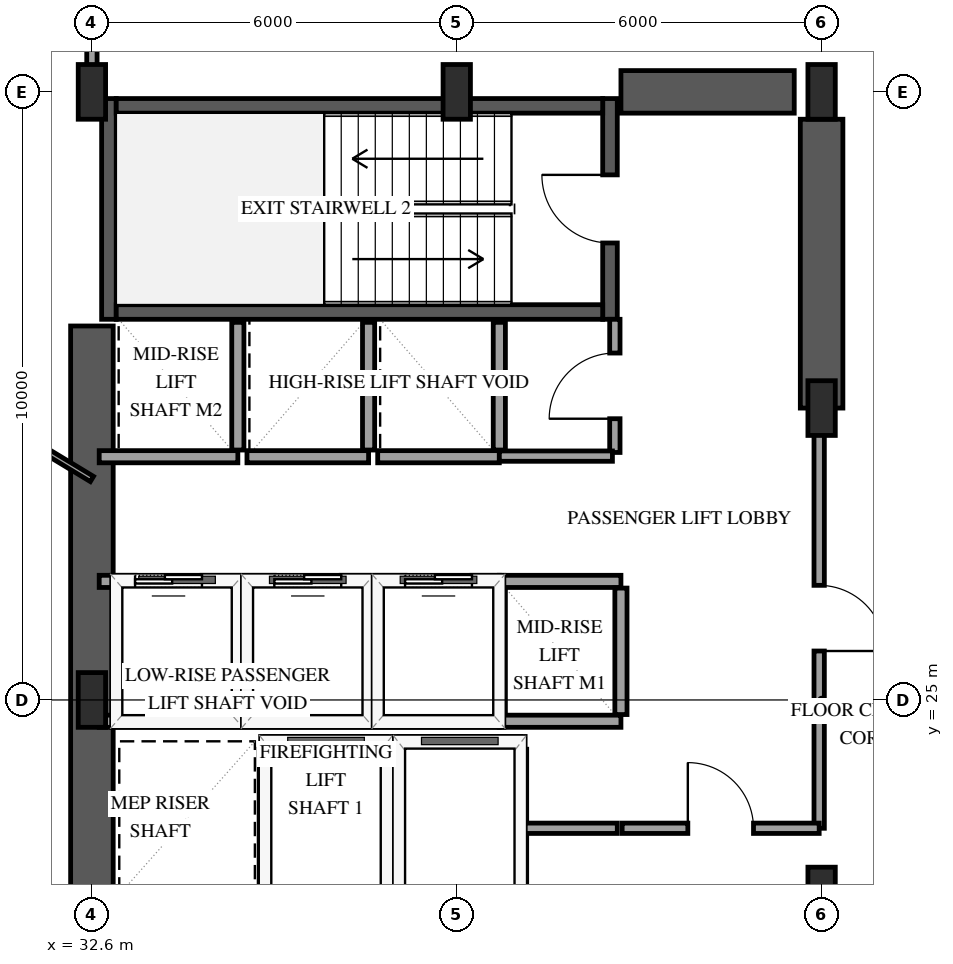
"""IFC4 building model, lengths in metres.
Left out: names, types, materials, properties, quantities, classifications, styles, units other than length and angle.
Written with IfcOpenShell. Run it as: python <this file> out.ifc"""

import sys

from ifc_helpers import new_model, si_unit, direction, frame, frame_2d, origin, origin_2d, place, context, subcontext, project, spatial, rectangle, extrude, element, fill, save


model = new_model("IFC4")
c1 = context("Model", 3, precision=1e-05, world=origin(), true_north=direction((0.0, 1.0)))
c2 = subcontext(c1, "Body", "Model", "MODEL_VIEW")
j1 = project(units=[si_unit("LENGTHUNIT", "METRE"), si_unit("PLANEANGLEUNIT", "RADIAN")], contexts=[c1])
p1 = place(None, origin())
s1 = spatial("IfcSite", under=j1, at=p1, CompositionType="ELEMENT")
p2 = place(p1, origin())
s2 = spatial("IfcBuilding", under=s1, at=p2, CompositionType="ELEMENT")
p3 = place(p2, frame((0.0, 0.0, 38.6)))
s3 = spatial("IfcBuildingStorey", under=s2, at=p3, CompositionType="ELEMENT", Elevation=38.6)
p4 = place(p3, frame((32.88, 31.26, 0.0), z_axis=(0.0, 0.0, 1.0), x_axis=(0.0, 1.0, 0.0)))
e1 = element("IfcWall", 1, at=p4, inside=s3, PredefinedType="SHEAR", context=c2, shape_type="SweptSolid", body=[
    extrude(rectangle(XDim=3.63, YDim=0.24, at=frame_2d((1.815, 0.0))), origin(), (0.0, 0.0, 1.0), 4.0),
])
p5 = place(p3, frame((41.12, 31.26, 0.0), z_axis=(0.0, 0.0, 1.0), x_axis=(0.0, 1.0, 0.0)))
e2 = element("IfcWall", 2, at=p5, inside=s3, PredefinedType="SHEAR", context=c2, shape_type="SweptSolid", body=[
    extrude(rectangle(XDim=3.63, YDim=0.24, at=frame_2d((1.815, 0.0))), origin(), (0.0, 0.0, 1.0), 4.0),
])
p6 = place(p5, frame((1.255, 0.0, 0.0)))
e3 = element("IfcOpeningElement", 3, at=p6, cuts=e2, PredefinedType="OPENING", context=c2, shape_type="SweptSolid", body=[
    extrude(rectangle(XDim=1.12, YDim=2.15, at=frame_2d((0.56, 1.075))), frame((0.0, 0.13, 0.0), z_axis=(0.0, -1.0, 0.0), x_axis=(1.0, 0.0, 0.0)), (0.0, 0.0, 1.0), 0.26),
])
for number, where, z_axis, x_axis in (
    (4, (33.0, 31.38, 0.0), (0.0, 0.0, 1.0), (1.0, 0.0, 0.0)),
    (5, (33.0, 34.77, 0.0), (0.0, 0.0, 1.0), (1.0, 0.0, 0.0)),
):
    element("IfcWall", number, at=place(p3, frame(where, z_axis=z_axis, x_axis=x_axis)), inside=s3, PredefinedType="SHEAR", context=c2, shape_type="SweptSolid", body=[
        extrude(rectangle(XDim=8.0, YDim=0.24, at=frame_2d((4.0, 0.0))), origin(), (0.0, 0.0, 1.0), 4.0),
    ])
p7 = place(p3, frame((32.6, 18.85, 0.0), z_axis=(0.0, 0.0, 1.0), x_axis=(0.0, 1.0, 0.0)))
e6 = element("IfcWall", 6, at=p7, inside=s3, PredefinedType="SHEAR", context=c2, shape_type="SweptSolid", body=[
    extrude(rectangle(XDim=12.3, YDim=0.7, at=frame_2d((6.15, 0.0))), origin(), (0.0, 0.0, 1.0), 4.0),
])
p8 = place(p3, frame((41.3, 35.0, 0.0), z_axis=(0.0, 0.0, 1.0), x_axis=(1.0, 0.0, 0.0)))
e7 = element("IfcWall", 7, at=p8, inside=s3, PredefinedType="SHEAR", context=c2, shape_type="SweptSolid", body=[
    extrude(rectangle(XDim=2.85, YDim=0.7, at=frame_2d((1.425, 0.0))), origin(), (0.0, 0.0, 1.0), 4.0),
])
p9 = place(p3, frame((44.6, 29.8, 0.0), z_axis=(0.0, 0.0, 1.0), x_axis=(0.0, 1.0, 0.0)))
e8 = element("IfcWall", 8, at=p9, inside=s3, PredefinedType="SHEAR", context=c2, shape_type="SweptSolid", body=[
    extrude(rectangle(XDim=4.75, YDim=0.7, at=frame_2d((2.375, 0.0))), origin(), (0.0, 0.0, 1.0), 4.0),
])
for number, where, z_axis, x_axis in (
    (9, (32.6, 25.0, 0.0), (0.0, 0.0, 1.0), (1.0, 0.0, 0.0)),
    (10, (32.6, 35.0, 0.0), (0.0, 0.0, 1.0), (1.0, 0.0, 0.0)),
    (11, (38.6, 35.0, 0.0), (0.0, 0.0, 1.0), (1.0, 0.0, 0.0)),
    (12, (44.6, 21.8, 0.0), (0.0, 0.0, 1.0), (1.0, 0.0, 0.0)),
    (13, (44.6, 29.8, 0.0), (0.0, 0.0, 1.0), (1.0, 0.0, 0.0)),
    (14, (44.6, 35.0, 0.0), (0.0, 0.0, 1.0), (1.0, 0.0, 0.0)),
):
    element("IfcColumn", number, at=place(p3, frame(where, z_axis=z_axis, x_axis=x_axis)), inside=s3, PredefinedType="PILASTER", context=c2, shape_type="SweptSolid", body=[
        extrude(rectangle(XDim=0.45, YDim=0.9, at=origin_2d()), origin(), (0.0, 0.0, 1.0), 4.0),
    ])
p10 = place(p3, frame((35.45, 24.3, 0.0), z_axis=(0.0, 0.0, 1.0), x_axis=(1.0, 0.0, 0.0)))
e15 = element("IfcWall", 15, at=p10, inside=s3, PredefinedType="SOLIDWALL", context=c2, shape_type="SweptSolid", body=[
    extrude(rectangle(XDim=2.0, YDim=0.2, at=frame_2d((1.0, 0.0))), origin(), (0.0, 0.0, 1.0), 3.7),
])
for number, where, z_axis, x_axis in (
    (16, (35.45, 21.81, 0.0), (0.0, 0.0, 1.0), (0.0, 1.0, 0.0)),
    (17, (37.45, 21.81, 0.0), (0.0, 0.0, 1.0), (0.0, 1.0, 0.0)),
):
    element("IfcWall", number, at=place(p3, frame(where, z_axis=z_axis, x_axis=x_axis)), inside=s3, PredefinedType="SOLIDWALL", context=c2, shape_type="SweptSolid", body=[
        extrude(rectangle(XDim=2.38, YDim=0.2, at=frame_2d((1.19, 0.0))), origin(), (0.0, 0.0, 1.0), 3.7),
    ])
p11 = place(p3, frame((37.65, 24.3, 0.0), z_axis=(0.0, 0.0, 1.0), x_axis=(1.0, 0.0, 0.0)))
e18 = element("IfcWall", 18, at=p11, inside=s3, PredefinedType="SOLIDWALL", context=c2, shape_type="SweptSolid", body=[
    extrude(rectangle(XDim=2.0, YDim=0.2, at=frame_2d((1.0, 0.0))), origin(), (0.0, 0.0, 1.0), 3.7),
])
p12 = place(p3, frame((39.65, 21.81, 0.0), z_axis=(0.0, 0.0, 1.0), x_axis=(0.0, 1.0, 0.0)))
e19 = element("IfcWall", 19, at=p12, inside=s3, PredefinedType="SOLIDWALL", context=c2, shape_type="SweptSolid", body=[
    extrude(rectangle(XDim=2.38, YDim=0.2, at=frame_2d((1.19, 0.0))), origin(), (0.0, 0.0, 1.0), 3.7),
])
p13 = place(p3, frame((32.72, 24.65, 0.0), z_axis=(0.0, 0.0, 1.0), x_axis=(1.0, 0.0, 0.0)))
e20 = element("IfcWall", 20, at=p13, inside=s3, PredefinedType="SOLIDWALL", context=c2, shape_type="SweptSolid", body=[
    extrude(rectangle(XDim=2.28, YDim=0.2, at=frame_2d((1.14, 0.0))), origin(), (0.0, 0.0, 1.0), 3.7),
])
p14 = place(p3, frame((32.72, 26.95, 0.0), z_axis=(0.0, 0.0, 1.0), x_axis=(1.0, 0.0, 0.0)))
e21 = element("IfcWall", 21, at=p14, inside=s3, PredefinedType="SOLIDWALL", context=c2, shape_type="SweptSolid", body=[
    extrude(rectangle(XDim=2.28, YDim=0.2, at=frame_2d((1.14, 0.0))), origin(), (0.0, 0.0, 1.0), 3.7),
])
p15 = place(p14, frame((0.59, 0.0, 0.0)))
e22 = element("IfcOpeningElement", 22, at=p15, cuts=e21, PredefinedType="OPENING", context=c2, shape_type="SweptSolid", body=[
    extrude(rectangle(XDim=1.1, YDim=2.15, at=frame_2d((0.55, 1.075))), frame((0.0, 0.11, 0.0), z_axis=(0.0, -1.0, 0.0), x_axis=(1.0, 0.0, 0.0)), (0.0, 0.0, 1.0), 0.22),
])
p16 = place(p3, frame((35.0, 24.76, 0.0), z_axis=(0.0, 0.0, 1.0), x_axis=(0.0, 1.0, 0.0)))
e23 = element("IfcWall", 23, at=p16, inside=s3, PredefinedType="SOLIDWALL", context=c2, shape_type="SweptSolid", body=[
    extrude(rectangle(XDim=2.08, YDim=0.2, at=frame_2d((1.04, 0.0))), origin(), (0.0, 0.0, 1.0), 3.7),
])
p17 = place(p3, frame((35.15, 24.65, 0.0), z_axis=(0.0, 0.0, 1.0), x_axis=(1.0, 0.0, 0.0)))
e24 = element("IfcWall", 24, at=p17, inside=s3, PredefinedType="SOLIDWALL", context=c2, shape_type="SweptSolid", body=[
    extrude(rectangle(XDim=2.0, YDim=0.2, at=frame_2d((1.0, 0.0))), origin(), (0.0, 0.0, 1.0), 3.7),
])
p18 = place(p3, frame((35.15, 26.95, 0.0), z_axis=(0.0, 0.0, 1.0), x_axis=(1.0, 0.0, 0.0)))
e25 = element("IfcWall", 25, at=p18, inside=s3, PredefinedType="SOLIDWALL", context=c2, shape_type="SweptSolid", body=[
    extrude(rectangle(XDim=2.0, YDim=0.2, at=frame_2d((1.0, 0.0))), origin(), (0.0, 0.0, 1.0), 3.7),
])
p19 = place(p18, frame((0.45, 0.0, 0.0)))
e26 = element("IfcOpeningElement", 26, at=p19, cuts=e25, PredefinedType="OPENING", context=c2, shape_type="SweptSolid", body=[
    extrude(rectangle(XDim=1.1, YDim=2.15, at=frame_2d((0.55, 1.075))), frame((0.0, 0.11, 0.0), z_axis=(0.0, -1.0, 0.0), x_axis=(1.0, 0.0, 0.0)), (0.0, 0.0, 1.0), 0.22),
])
p20 = place(p3, frame((37.15, 24.76, 0.0), z_axis=(0.0, 0.0, 1.0), x_axis=(0.0, 1.0, 0.0)))
e27 = element("IfcWall", 27, at=p20, inside=s3, PredefinedType="SOLIDWALL", context=c2, shape_type="SweptSolid", body=[
    extrude(rectangle(XDim=2.08, YDim=0.2, at=frame_2d((1.04, 0.0))), origin(), (0.0, 0.0, 1.0), 3.7),
])
p21 = place(p3, frame((37.3, 24.65, 0.0), z_axis=(0.0, 0.0, 1.0), x_axis=(1.0, 0.0, 0.0)))
e28 = element("IfcWall", 28, at=p21, inside=s3, PredefinedType="SOLIDWALL", context=c2, shape_type="SweptSolid", body=[
    extrude(rectangle(XDim=2.0, YDim=0.2, at=frame_2d((1.0, 0.0))), origin(), (0.0, 0.0, 1.0), 3.7),
])
p22 = place(p3, frame((37.3, 26.95, 0.0), z_axis=(0.0, 0.0, 1.0), x_axis=(1.0, 0.0, 0.0)))
e29 = element("IfcWall", 29, at=p22, inside=s3, PredefinedType="SOLIDWALL", context=c2, shape_type="SweptSolid", body=[
    extrude(rectangle(XDim=2.0, YDim=0.2, at=frame_2d((1.0, 0.0))), origin(), (0.0, 0.0, 1.0), 3.7),
])
p23 = place(p22, frame((0.45, 0.0, 0.0)))
e30 = element("IfcOpeningElement", 30, at=p23, cuts=e29, PredefinedType="OPENING", context=c2, shape_type="SweptSolid", body=[
    extrude(rectangle(XDim=1.1, YDim=2.15, at=frame_2d((0.55, 1.075))), frame((0.0, 0.11, 0.0), z_axis=(0.0, -1.0, 0.0), x_axis=(1.0, 0.0, 0.0)), (0.0, 0.0, 1.0), 0.22),
])
p24 = place(p3, frame((39.3, 24.76, 0.0), z_axis=(0.0, 0.0, 1.0), x_axis=(0.0, 1.0, 0.0)))
e31 = element("IfcWall", 31, at=p24, inside=s3, PredefinedType="SOLIDWALL", context=c2, shape_type="SweptSolid", body=[
    extrude(rectangle(XDim=2.08, YDim=0.2, at=frame_2d((1.04, 0.0))), origin(), (0.0, 0.0, 1.0), 3.7),
])
for number, where, z_axis, x_axis in (
    (32, (39.3, 24.65, 0.0), (0.0, 0.0, 1.0), (1.0, 0.0, 0.0)),
    (33, (39.3, 26.95, 0.0), (0.0, 0.0, 1.0), (1.0, 0.0, 0.0)),
):
    element("IfcWall", number, at=place(p3, frame(where, z_axis=z_axis, x_axis=x_axis)), inside=s3, PredefinedType="SOLIDWALL", context=c2, shape_type="SweptSolid", body=[
        extrude(rectangle(XDim=2.0, YDim=0.2, at=frame_2d((1.0, 0.0))), origin(), (0.0, 0.0, 1.0), 3.7),
    ])
p25 = place(p3, frame((41.3, 24.76, 0.0), z_axis=(0.0, 0.0, 1.0), x_axis=(0.0, 1.0, 0.0)))
e34 = element("IfcWall", 34, at=p25, inside=s3, PredefinedType="SOLIDWALL", context=c2, shape_type="SweptSolid", body=[
    extrude(rectangle(XDim=2.08, YDim=0.2, at=frame_2d((1.04, 0.0))), origin(), (0.0, 0.0, 1.0), 3.7),
])
p26 = place(p3, frame((32.72, 29.0, 0.0), z_axis=(0.0, 0.0, 1.0), x_axis=(1.0, 0.0, 0.0)))
e35 = element("IfcWall", 35, at=p26, inside=s3, PredefinedType="SOLIDWALL", context=c2, shape_type="SweptSolid", body=[
    extrude(rectangle(XDim=2.28, YDim=0.2, at=frame_2d((1.14, 0.0))), origin(), (0.0, 0.0, 1.0), 3.7),
])
p27 = place(p3, frame((35.0, 29.11, 0.0), z_axis=(0.0, 0.0, 1.0), x_axis=(0.0, 1.0, 0.0)))
e36 = element("IfcWall", 36, at=p27, inside=s3, PredefinedType="SOLIDWALL", context=c2, shape_type="SweptSolid", body=[
    extrude(rectangle(XDim=2.1, YDim=0.2, at=frame_2d((1.05, 0.0))), origin(), (0.0, 0.0, 1.0), 3.7),
])
p28 = place(p3, frame((35.15, 29.0, 0.0), z_axis=(0.0, 0.0, 1.0), x_axis=(1.0, 0.0, 0.0)))
e37 = element("IfcWall", 37, at=p28, inside=s3, PredefinedType="SOLIDWALL", context=c2, shape_type="SweptSolid", body=[
    extrude(rectangle(XDim=2.0, YDim=0.2, at=frame_2d((1.0, 0.0))), origin(), (0.0, 0.0, 1.0), 3.7),
])
p29 = place(p3, frame((37.15, 29.11, 0.0), z_axis=(0.0, 0.0, 1.0), x_axis=(0.0, 1.0, 0.0)))
e38 = element("IfcWall", 38, at=p29, inside=s3, PredefinedType="SOLIDWALL", context=c2, shape_type="SweptSolid", body=[
    extrude(rectangle(XDim=2.1, YDim=0.2, at=frame_2d((1.05, 0.0))), origin(), (0.0, 0.0, 1.0), 3.7),
])
p30 = place(p3, frame((37.3, 29.0, 0.0), z_axis=(0.0, 0.0, 1.0), x_axis=(1.0, 0.0, 0.0)))
e39 = element("IfcWall", 39, at=p30, inside=s3, PredefinedType="SOLIDWALL", context=c2, shape_type="SweptSolid", body=[
    extrude(rectangle(XDim=2.0, YDim=0.2, at=frame_2d((1.0, 0.0))), origin(), (0.0, 0.0, 1.0), 3.7),
])
p31 = place(p3, frame((39.3, 29.11, 0.0), z_axis=(0.0, 0.0, 1.0), x_axis=(0.0, 1.0, 0.0)))
e40 = element("IfcWall", 40, at=p31, inside=s3, PredefinedType="SOLIDWALL", context=c2, shape_type="SweptSolid", body=[
    extrude(rectangle(XDim=2.1, YDim=0.2, at=frame_2d((1.05, 0.0))), origin(), (0.0, 0.0, 1.0), 3.7),
])
p32 = place(p3, frame((32.6, 28.634, 0.0), z_axis=(0.0, 0.0, 1.0), x_axis=(-0.855385077894, 0.517992633651, 0.0)))
e41 = element("IfcWall", 41, at=p32, inside=s3, PredefinedType="PARTITIONING", context=c2, shape_type="SweptSolid", body=[
    extrude(rectangle(XDim=7.896, YDim=0.1, at=frame_2d((3.948, 0.0))), origin(), (0.0, 0.0, 1.0), 3.7),
])
p33 = place(p3, frame((44.56, 29.8, 0.0), z_axis=(0.0, 0.0, 1.0), x_axis=(0.0, -1.0, 0.0)))
e42 = element("IfcWall", 42, at=p33, inside=s3, PredefinedType="PARTITIONING", context=c2, shape_type="SweptSolid", body=[
    extrude(rectangle(XDim=6.91, YDim=0.17, at=frame_2d((3.455, 0.0))), origin(), (0.0, 0.0, 1.0), 2.74),
])
p34 = place(p33, frame((2.915, 0.0, 0.0)))
e43 = element("IfcOpeningElement", 43, at=p34, cuts=e42, PredefinedType="OPENING", context=c2, shape_type="SweptSolid", body=[
    extrude(rectangle(XDim=1.08, YDim=2.15, at=frame_2d((0.54, 1.075))), frame((0.0, 0.095, 0.0), z_axis=(0.0, -1.0, 0.0), x_axis=(1.0, 0.0, 0.0)), (0.0, 0.0, 1.0), 0.19),
])
p35 = place(p3, frame((41.32, 22.89, 0.0), z_axis=(0.0, 0.0, 1.0), x_axis=(1.0, 0.0, 0.0)))
e44 = element("IfcWall", 44, at=p35, inside=s3, PredefinedType="PARTITIONING", context=c2, shape_type="SweptSolid", body=[
    extrude(rectangle(XDim=3.24, YDim=0.17, at=frame_2d((1.62, 0.0))), origin(), (0.0, 0.0, 1.0), 3.7),
])
p36 = place(p35, frame((1.08, 0.0, 0.0)))
e45 = element("IfcOpeningElement", 45, at=p36, cuts=e44, PredefinedType="OPENING", context=c2, shape_type="SweptSolid", body=[
    extrude(rectangle(XDim=1.08, YDim=2.15, at=frame_2d((0.54, 1.075))), frame((0.0, 0.095, 0.0), z_axis=(0.0, -1.0, 0.0), x_axis=(1.0, 0.0, 0.0)), (0.0, 0.0, 1.0), 0.19),
])
p37 = place(p3, frame((41.2, 29.07, 0.0), z_axis=(0.0, 0.0, 1.0), x_axis=(0.0, 1.0, 0.0)))
e46 = element("IfcWall", 46, at=p37, inside=s3, PredefinedType="PARTITIONING", context=c2, shape_type="SweptSolid", body=[
    extrude(rectangle(XDim=2.19, YDim=0.17, at=frame_2d((1.095, 0.0))), origin(), (0.0, 0.0, 1.0), 3.7),
])
p38 = place(p37, frame((0.555, 0.0, 0.0)))
e47 = element("IfcOpeningElement", 47, at=p38, cuts=e46, PredefinedType="OPENING", context=c2, shape_type="SweptSolid", body=[
    extrude(rectangle(XDim=1.08, YDim=2.15, at=frame_2d((0.54, 1.075))), frame((0.0, 0.095, 0.0), z_axis=(0.0, -1.0, 0.0), x_axis=(1.0, 0.0, 0.0)), (0.0, 0.0, 1.0), 0.19),
])
p39 = place(p3, frame((32.6, 35.07, 0.0), z_axis=(0.0, 0.0, 1.0), x_axis=(0.0, 1.0, 0.0)))
e48 = element("IfcWall", 48, at=p39, inside=s3, PredefinedType="PARTITIONING", context=c2, shape_type="SweptSolid", body=[
    extrude(rectangle(XDim=1.91, YDim=0.17, at=frame_2d((0.955, 0.0))), origin(), (0.0, 0.0, 1.0), 3.7),
])
p40 = place(p3, frame((39.3, 29.01, 0.0), z_axis=(0.0, 0.0, 1.0), x_axis=(1.0, 0.0, 0.0)))
e49 = element("IfcWall", 49, at=p40, inside=s3, PredefinedType="PARTITIONING", context=c2, shape_type="SweptSolid", body=[
    extrude(rectangle(XDim=1.86, YDim=0.17, at=frame_2d((0.93, 0.0))), origin(), (0.0, 0.0, 1.0), 3.7),
])
p41 = place(p3, frame((39.72, 22.89, 0.0), z_axis=(0.0, 0.0, 1.0), x_axis=(1.0, 0.0, 0.0)))
e50 = element("IfcWall", 50, at=p41, inside=s3, PredefinedType="PARTITIONING", context=c2, shape_type="SweptSolid", body=[
    extrude(rectangle(XDim=1.52, YDim=0.17, at=frame_2d((0.76, 0.0))), origin(), (0.0, 0.0, 1.0), 3.7),
])
p42 = place(p15, origin())
e51 = element("IfcDoor", 51, at=p42, inside=s3, OperationType="SLIDING_TO_LEFT", PredefinedType="DOOR", context=c2, shape_type="SweptSolid", body=[
    extrude(rectangle(XDim=1.1, YDim=2.15, at=frame_2d((0.55, 1.075))), frame((0.0, 0.025, 0.0), z_axis=(0.0, -1.0, 0.0), x_axis=(1.0, 0.0, 0.0)), (0.0, 0.0, 1.0), 0.05),
])
fill(e22, e51)
p43 = place(p19, origin())
e52 = element("IfcDoor", 52, at=p43, inside=s3, OperationType="SLIDING_TO_LEFT", PredefinedType="DOOR", context=c2, shape_type="SweptSolid", body=[
    extrude(rectangle(XDim=1.1, YDim=2.15, at=frame_2d((0.55, 1.075))), frame((0.0, 0.025, 0.0), z_axis=(0.0, -1.0, 0.0), x_axis=(1.0, 0.0, 0.0)), (0.0, 0.0, 1.0), 0.05),
])
fill(e26, e52)
p44 = place(p23, origin())
e53 = element("IfcDoor", 53, at=p44, inside=s3, OperationType="SLIDING_TO_LEFT", PredefinedType="DOOR", context=c2, shape_type="SweptSolid", body=[
    extrude(rectangle(XDim=1.1, YDim=2.15, at=frame_2d((0.55, 1.075))), frame((0.0, 0.025, 0.0), z_axis=(0.0, -1.0, 0.0), x_axis=(1.0, 0.0, 0.0)), (0.0, 0.0, 1.0), 0.05),
])
fill(e30, e53)
p45 = place(p6, origin())
e54 = element("IfcDoor", 54, at=p45, inside=s3, OperationType="SINGLE_SWING_RIGHT", PredefinedType="DOOR", context=c2, shape_type="SweptSolid", body=[
    extrude(rectangle(XDim=1.12, YDim=2.15, at=frame_2d((0.56, 1.075))), frame((0.0, 0.025, 0.0), z_axis=(0.0, -1.0, 0.0), x_axis=(1.0, 0.0, 0.0)), (0.0, 0.0, 1.0), 0.05),
])
fill(e3, e54)
p46 = place(p34, origin())
e55 = element("IfcDoor", 55, at=p46, inside=s3, OperationType="SINGLE_SWING_RIGHT", PredefinedType="DOOR", context=c2, shape_type="SweptSolid", body=[
    extrude(rectangle(XDim=1.08, YDim=2.15, at=frame_2d((0.54, 1.075))), frame((0.0, 0.025, 0.0), z_axis=(0.0, -1.0, 0.0), x_axis=(1.0, 0.0, 0.0)), (0.0, 0.0, 1.0), 0.05),
])
fill(e43, e55)
p47 = place(p36, origin())
e56 = element("IfcDoor", 56, at=p47, inside=s3, OperationType="SINGLE_SWING_LEFT", PredefinedType="DOOR", context=c2, shape_type="SweptSolid", body=[
    extrude(rectangle(XDim=1.08, YDim=2.15, at=frame_2d((0.54, 1.075))), frame((0.0, 0.025, 0.0), z_axis=(0.0, -1.0, 0.0), x_axis=(1.0, 0.0, 0.0)), (0.0, 0.0, 1.0), 0.05),
])
fill(e45, e56)
p48 = place(p38, origin())
e57 = element("IfcDoor", 57, at=p48, inside=s3, OperationType="SINGLE_SWING_LEFT", PredefinedType="DOOR", context=c2, shape_type="SweptSolid", body=[
    extrude(rectangle(XDim=1.08, YDim=2.15, at=frame_2d((0.54, 1.075))), frame((0.0, 0.025, 0.0), z_axis=(0.0, -1.0, 0.0), x_axis=(1.0, 0.0, 0.0)), (0.0, 0.0, 1.0), 0.05),
])
fill(e47, e57)
save(model, sys.argv[1])
